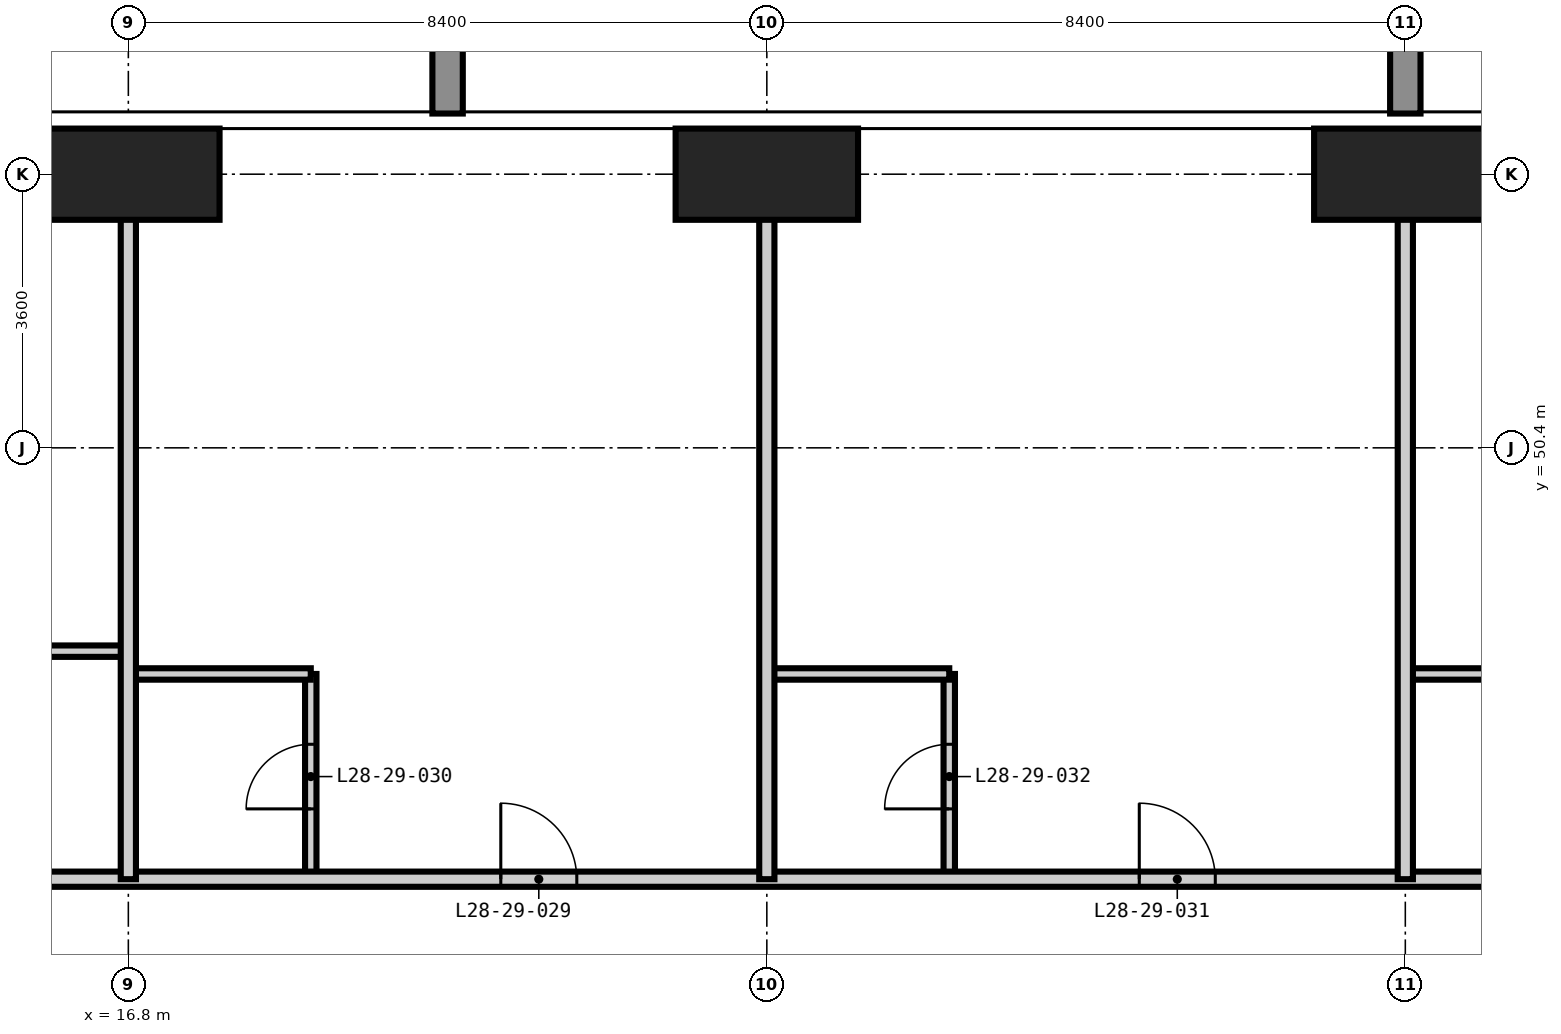
"""IFC4 building model, lengths in metres.
Left out: names, types, materials, properties, quantities, classifications, styles, units other than length and angle.
Written with IfcOpenShell. Run it as: python <this file> out.ifc"""

import sys

from ifc_helpers import new_model, si_unit, direction, frame, frame_2d, origin, origin_2d, place, context, subcontext, project, spatial, rectangle, extrude, element, fill, save


model = new_model("IFC4")
c1 = context("Model", 3, precision=1e-05, world=origin(), true_north=direction((0.0, 1.0)))
c2 = subcontext(c1, "Body", "Model", "MODEL_VIEW")
j1 = project(units=[si_unit("LENGTHUNIT", "METRE"), si_unit("PLANEANGLEUNIT", "RADIAN")], contexts=[c1])
p1 = place(None, origin())
s1 = spatial("IfcSite", under=j1, at=p1, CompositionType="ELEMENT")
p2 = place(p1, origin())
s2 = spatial("IfcBuilding", under=s1, at=p2, CompositionType="ELEMENT")
p3 = place(p2, frame((0.0, 0.0, 111.6)))
s3 = spatial("IfcBuildingStorey", under=s2, at=p3, CompositionType="ELEMENT", Elevation=111.6)
for number, where, z_axis, x_axis in (
    (1, (16.8, 54.0, -0.35), (0.0, 0.0, 1.0), (1.0, 0.0, 0.0)),
    (2, (25.2, 54.0, -0.35), (0.0, 0.0, 1.0), (1.0, 0.0, 0.0)),
    (3, (33.6, 54.0, -0.35), (0.0, 0.0, 1.0), (1.0, 0.0, 0.0)),
):
    element("IfcColumn", number, at=place(p3, frame(where, z_axis=z_axis, x_axis=x_axis)), inside=s3, PredefinedType="COLUMN", context=c2, shape_type="SweptSolid", body=[
        extrude(rectangle(XDim=2.4, YDim=1.2, at=origin_2d()), origin(), (0.0, 0.0, 1.0), 3.6),
    ])
p4 = place(p3, frame((19.2, 44.725, 0.0), z_axis=(0.0, 0.0, 1.0), x_axis=(0.0, 1.0, 0.0)))
e4 = element("IfcWall", 4, at=p4, inside=s3, PredefinedType="PARTITIONING", context=c2, shape_type="SweptSolid", body=[
    extrude(rectangle(XDim=2.7, YDim=0.15, at=frame_2d((1.35, 0.0))), origin(), (0.0, 0.0, 1.0), 3.25),
])
p5 = place(p4, frame((0.925, 0.0, 0.0)))
e5 = element("IfcOpeningElement", 5, at=p5, cuts=e4, PredefinedType="OPENING", context=c2, shape_type="SweptSolid", body=[
    extrude(rectangle(XDim=0.85, YDim=2.1, at=frame_2d((0.425, 1.05))), frame((0.0, 0.085, 0.0), z_axis=(0.0, -1.0, 0.0), x_axis=(1.0, 0.0, 0.0)), (0.0, 0.0, 1.0), 0.17),
])
p6 = place(p3, frame((27.6, 44.725, 0.0), z_axis=(0.0, 0.0, 1.0), x_axis=(0.0, 1.0, 0.0)))
e6 = element("IfcWall", 6, at=p6, inside=s3, PredefinedType="PARTITIONING", context=c2, shape_type="SweptSolid", body=[
    extrude(rectangle(XDim=2.7, YDim=0.15, at=frame_2d((1.35, 0.0))), origin(), (0.0, 0.0, 1.0), 3.25),
])
p7 = place(p6, frame((0.925, 0.0, 0.0)))
e7 = element("IfcOpeningElement", 7, at=p7, cuts=e6, PredefinedType="OPENING", context=c2, shape_type="SweptSolid", body=[
    extrude(rectangle(XDim=0.85, YDim=2.1, at=frame_2d((0.425, 1.05))), frame((0.0, 0.085, 0.0), z_axis=(0.0, -1.0, 0.0), x_axis=(1.0, 0.0, 0.0)), (0.0, 0.0, 1.0), 0.17),
])
p8 = place(p3, frame((16.8, 47.425, 0.0), z_axis=(0.0, 0.0, 1.0), x_axis=(1.0, 0.0, 0.0)))
e8 = element("IfcWall", 8, at=p8, inside=s3, PredefinedType="PARTITIONING", context=c2, shape_type="SweptSolid", body=[
    extrude(rectangle(XDim=2.4, YDim=0.15, at=frame_2d((1.2, 0.0))), origin(), (0.0, 0.0, 1.0), 3.25),
])
p9 = place(p3, frame((25.2, 47.425, 0.0), z_axis=(0.0, 0.0, 1.0), x_axis=(1.0, 0.0, 0.0)))
e9 = element("IfcWall", 9, at=p9, inside=s3, PredefinedType="PARTITIONING", context=c2, shape_type="SweptSolid", body=[
    extrude(rectangle(XDim=2.4, YDim=0.15, at=frame_2d((1.2, 0.0))), origin(), (0.0, 0.0, 1.0), 3.25),
])
p10 = place(p3, frame((33.6, 47.425, 0.0), z_axis=(0.0, 0.0, 1.0), x_axis=(1.0, 0.0, 0.0)))
e10 = element("IfcWall", 10, at=p10, inside=s3, PredefinedType="PARTITIONING", context=c2, shape_type="SweptSolid", body=[
    extrude(rectangle(XDim=2.4, YDim=0.15, at=frame_2d((1.2, 0.0))), origin(), (0.0, 0.0, 1.0), 3.25),
])
p11 = place(p3, frame((12.6, 47.725, 0.0), z_axis=(0.0, 0.0, 1.0), x_axis=(1.0, 0.0, 0.0)))
e11 = element("IfcWall", 11, at=p11, inside=s3, PredefinedType="PARTITIONING", context=c2, shape_type="SweptSolid", body=[
    extrude(rectangle(XDim=4.2, YDim=0.15, at=frame_2d((2.1, 0.0))), origin(), (0.0, 0.0, 1.0), 3.25),
])
p12 = place(p11, frame((1.675, 0.0, 0.0)))
e12 = element("IfcOpeningElement", 12, at=p12, cuts=e11, PredefinedType="OPENING", context=c2, shape_type="SweptSolid", body=[
    extrude(rectangle(XDim=0.85, YDim=2.1, at=frame_2d((0.425, 1.05))), frame((0.0, 0.085, 0.0), z_axis=(0.0, -1.0, 0.0), x_axis=(1.0, 0.0, 0.0)), (0.0, 0.0, 1.0), 0.17),
])
p13 = place(p3, frame((12.6, 44.725, 0.0), z_axis=(0.0, 0.0, 1.0), x_axis=(1.0, 0.0, 0.0)))
e13 = element("IfcWall", 13, at=p13, inside=s3, PredefinedType="PARTITIONING", context=c2, shape_type="SweptSolid", body=[
    extrude(rectangle(XDim=32.725, YDim=0.2, at=frame_2d((16.362, 0.0))), origin(), (0.0, 0.0, 1.0), 3.25),
])
p14 = place(p13, frame((9.1, 0.0, 0.0)))
e14 = element("IfcOpeningElement", 14, at=p14, cuts=e13, PredefinedType="OPENING", context=c2, shape_type="SweptSolid", body=[
    extrude(rectangle(XDim=1.0, YDim=2.2, at=frame_2d((0.5, 1.1))), frame((0.0, 0.11, 0.0), z_axis=(0.0, -1.0, 0.0), x_axis=(1.0, 0.0, 0.0)), (0.0, 0.0, 1.0), 0.22),
])
p15 = place(p13, frame((17.5, 0.0, 0.0)))
e15 = element("IfcOpeningElement", 15, at=p15, cuts=e13, PredefinedType="OPENING", context=c2, shape_type="SweptSolid", body=[
    extrude(rectangle(XDim=1.0, YDim=2.2, at=frame_2d((0.5, 1.1))), frame((0.0, 0.11, 0.0), z_axis=(0.0, -1.0, 0.0), x_axis=(1.0, 0.0, 0.0)), (0.0, 0.0, 1.0), 0.22),
])
p16 = place(p13, frame((25.9, 0.0, 0.0)))
e16 = element("IfcOpeningElement", 16, at=p16, cuts=e13, PredefinedType="OPENING", context=c2, shape_type="SweptSolid", body=[
    extrude(rectangle(XDim=1.0, YDim=2.2, at=frame_2d((0.5, 1.1))), frame((0.0, 0.11, 0.0), z_axis=(0.0, -1.0, 0.0), x_axis=(1.0, 0.0, 0.0)), (0.0, 0.0, 1.0), 0.22),
])
for number, where, z_axis, x_axis in (
    (17, (16.8, 44.725, 0.0), (0.0, 0.0, 1.0), (0.0, 1.0, 0.0)),
    (18, (25.2, 44.725, 0.0), (0.0, 0.0, 1.0), (0.0, 1.0, 0.0)),
    (19, (33.6, 44.725, 0.0), (0.0, 0.0, 1.0), (0.0, 1.0, 0.0)),
):
    element("IfcWall", number, at=place(p3, frame(where, z_axis=z_axis, x_axis=x_axis)), inside=s3, PredefinedType="PARTITIONING", context=c2, shape_type="SweptSolid", body=[
        extrude(rectangle(XDim=9.893, YDim=0.2, at=frame_2d((4.946, 0.0))), origin(), (0.0, 0.0, 1.0), 3.25),
    ])
p17 = place(p14, origin())
e20 = element("IfcDoor", 20, at=p17, inside=s3, OperationType="SINGLE_SWING_LEFT", PredefinedType="DOOR", context=c2, shape_type="SweptSolid", body=[
    extrude(rectangle(XDim=1.0, YDim=2.2, at=frame_2d((0.5, 1.1))), frame((0.0, 0.025, 0.0), z_axis=(0.0, -1.0, 0.0), x_axis=(1.0, 0.0, 0.0)), (0.0, 0.0, 1.0), 0.05),
])
fill(e14, e20)
p18 = place(p5, origin())
e21 = element("IfcDoor", 21, at=p18, inside=s3, OperationType="SINGLE_SWING_LEFT", PredefinedType="DOOR", context=c2, shape_type="SweptSolid", body=[
    extrude(rectangle(XDim=0.85, YDim=2.1, at=frame_2d((0.425, 1.05))), frame((0.0, 0.025, 0.0), z_axis=(0.0, -1.0, 0.0), x_axis=(1.0, 0.0, 0.0)), (0.0, 0.0, 1.0), 0.05),
])
fill(e5, e21)
p19 = place(p15, origin())
e22 = element("IfcDoor", 22, at=p19, inside=s3, OperationType="SINGLE_SWING_LEFT", PredefinedType="DOOR", context=c2, shape_type="SweptSolid", body=[
    extrude(rectangle(XDim=1.0, YDim=2.2, at=frame_2d((0.5, 1.1))), frame((0.0, 0.025, 0.0), z_axis=(0.0, -1.0, 0.0), x_axis=(1.0, 0.0, 0.0)), (0.0, 0.0, 1.0), 0.05),
])
fill(e15, e22)
p20 = place(p7, origin())
e23 = element("IfcDoor", 23, at=p20, inside=s3, OperationType="SINGLE_SWING_LEFT", PredefinedType="DOOR", context=c2, shape_type="SweptSolid", body=[
    extrude(rectangle(XDim=0.85, YDim=2.1, at=frame_2d((0.425, 1.05))), frame((0.0, 0.025, 0.0), z_axis=(0.0, -1.0, 0.0), x_axis=(1.0, 0.0, 0.0)), (0.0, 0.0, 1.0), 0.05),
])
fill(e7, e23)
save(model, sys.argv[1])
